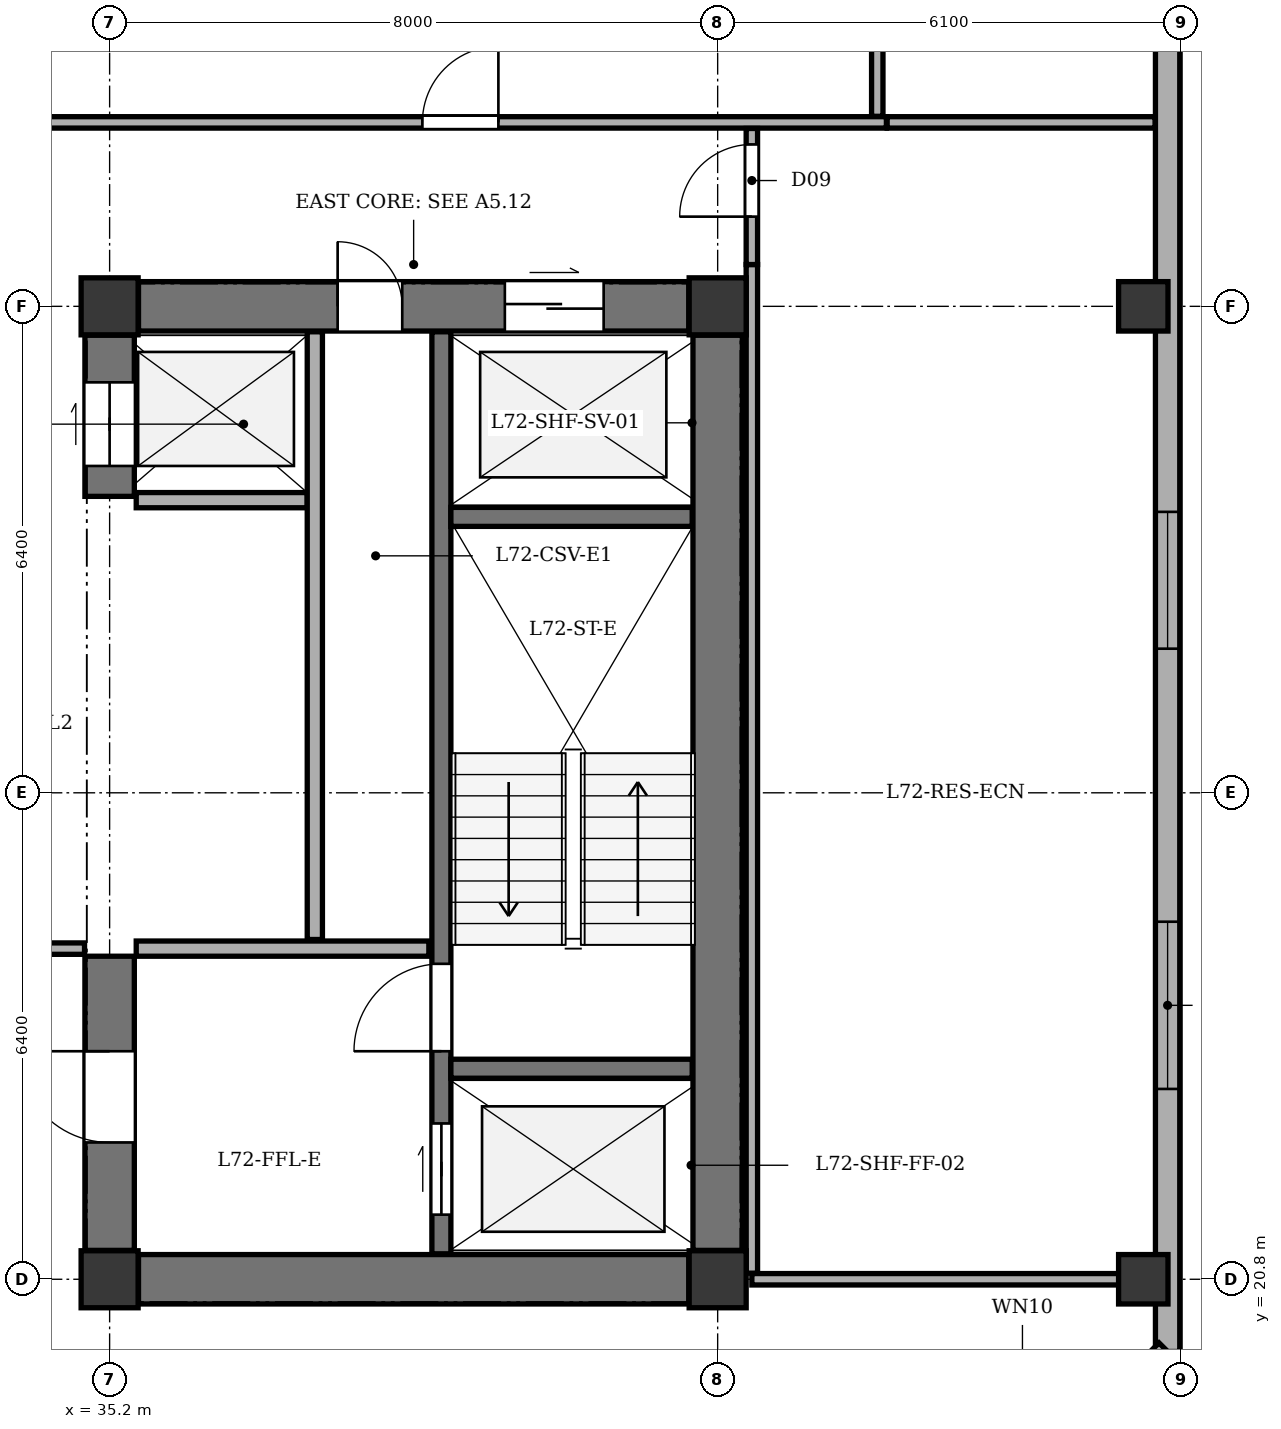
"""IFC4 building model, lengths in metres.
Left out: names, types, materials, properties, quantities, classifications, styles, units other than length and angle.
Written with IfcOpenShell. Run it as: python <this file> out.ifc"""

import sys

from ifc_helpers import new_model, si_unit, direction, frame, frame_2d, origin, origin_2d, place, context, subcontext, project, spatial, rectangle, extrude, element, fill, save


model = new_model("IFC4")
c1 = context("Model", 3, precision=1e-05, world=origin(), true_north=direction((0.0, 1.0)))
c2 = subcontext(c1, "Body", "Model", "MODEL_VIEW")
j1 = project(units=[si_unit("LENGTHUNIT", "METRE"), si_unit("PLANEANGLEUNIT", "RADIAN")], contexts=[c1])
p1 = place(None, origin())
s1 = spatial("IfcSite", under=j1, at=p1, CompositionType="ELEMENT")
p2 = place(p1, origin())
s2 = spatial("IfcBuilding", under=s1, at=p2, CompositionType="ELEMENT")
p3 = place(p2, frame((0.0, 0.0, 272.1)))
s3 = spatial("IfcBuildingStorey", under=s2, at=p3, CompositionType="ELEMENT", Elevation=272.1)
for number, where, z_axis, x_axis in (
    (1, (35.2, 20.8, 0.0), (0.0, 0.0, 1.0), (1.0, 0.0, 0.0)),
    (2, (43.2, 20.8, 0.0), (0.0, 0.0, 1.0), (1.0, 0.0, 0.0)),
    (3, (35.2, 33.6, 0.0), (0.0, 0.0, 1.0), (1.0, 0.0, 0.0)),
    (4, (43.2, 33.6, 0.0), (0.0, 0.0, 1.0), (1.0, 0.0, 0.0)),
):
    element("IfcColumn", number, at=place(p3, frame(where, z_axis=z_axis, x_axis=x_axis)), inside=s3, PredefinedType="COLUMN", context=c2, shape_type="SweptSolid", body=[
        extrude(rectangle(XDim=0.75, YDim=0.75, at=origin_2d()), origin(), (0.0, 0.0, 1.0), 3.4),
    ])
for number, where, z_axis, x_axis in (
    (5, (48.8, 20.8, 0.0), (0.0, 0.0, 1.0), (1.0, 0.0, 0.0)),
    (6, (48.8, 33.6, 0.0), (0.0, 0.0, 1.0), (1.0, 0.0, 0.0)),
):
    element("IfcColumn", number, at=place(p3, frame(where, z_axis=z_axis, x_axis=x_axis)), inside=s3, PredefinedType="COLUMN", context=c2, shape_type="SweptSolid", body=[
        extrude(rectangle(XDim=0.65, YDim=0.65, at=origin_2d()), origin(), (0.0, 0.0, 1.0), 3.4),
    ])
p4 = place(p3, frame((49.12, 41.1, 0.0), z_axis=(0.0, 0.0, 1.0), x_axis=(0.0, -1.0, 0.0)))
e7 = element("IfcWall", 7, at=p4, inside=s3, PredefinedType="STANDARD", context=c2, shape_type="SweptSolid", body=[
    extrude(rectangle(XDim=21.25, YDim=0.32, at=frame_2d((10.625, 0.0))), origin(), (0.0, 0.0, 1.0), 2.725),
])
p5 = place(p4, frame((1.74, 0.0, 0.75)))
e8 = element("IfcOpeningElement", 8, at=p5, cuts=e7, PredefinedType="OPENING", context=c2, shape_type="SweptSolid", body=[
    extrude(rectangle(XDim=1.8, YDim=1.7, at=frame_2d((0.9, 0.85))), frame((0.0, 0.17, 0.0), z_axis=(0.0, -1.0, 0.0), x_axis=(1.0, 0.0, 0.0)), (0.0, 0.0, 1.0), 0.34),
])
p6 = place(p4, frame((10.204, 0.0, 0.75)))
e9 = element("IfcOpeningElement", 9, at=p6, cuts=e7, PredefinedType="OPENING", context=c2, shape_type="SweptSolid", body=[
    extrude(rectangle(XDim=1.8, YDim=1.7, at=frame_2d((0.9, 0.85))), frame((0.0, 0.17, 0.0), z_axis=(0.0, -1.0, 0.0), x_axis=(1.0, 0.0, 0.0)), (0.0, 0.0, 1.0), 0.34),
])
p7 = place(p4, frame((15.596, 0.0, 0.75)))
e10 = element("IfcOpeningElement", 10, at=p7, cuts=e7, PredefinedType="OPENING", context=c2, shape_type="SweptSolid", body=[
    extrude(rectangle(XDim=2.2, YDim=1.7, at=frame_2d((1.1, 0.85))), frame((0.0, 0.17, 0.0), z_axis=(0.0, -1.0, 0.0), x_axis=(1.0, 0.0, 0.0)), (0.0, 0.0, 1.0), 0.34),
])
p8 = place(p3, frame((49.12, 19.85, 0.0), z_axis=(0.0, 0.0, 1.0), x_axis=(-0.707106781187, -0.707106781187, 0.0)))
e11 = element("IfcWall", 11, at=p8, inside=s3, PredefinedType="STANDARD", context=c2, shape_type="SweptSolid", body=[
    extrude(rectangle(XDim=5.402, YDim=0.32, at=frame_2d((2.701, 0.0))), origin(), (0.0, 0.0, 1.0), 2.725),
])
p9 = place(p8, frame((2.001, 0.0, 0.75)))
e12 = element("IfcOpeningElement", 12, at=p9, cuts=e11, PredefinedType="OPENING", context=c2, shape_type="SweptSolid", body=[
    extrude(rectangle(XDim=1.4, YDim=1.65, at=frame_2d((0.7, 0.825))), frame((0.0, 0.17, 0.0), z_axis=(0.0, -1.0, 0.0), x_axis=(1.0, 0.0, 0.0)), (0.0, 0.0, 1.0), 0.34),
])
p10 = place(p3, frame((43.2, 21.18, 0.0), z_axis=(0.0, 0.0, 1.0), x_axis=(0.0, 1.0, 0.0)))
e13 = element("IfcWall", 13, at=p10, inside=s3, PredefinedType="SHEAR", context=c2, shape_type="SweptSolid", body=[
    extrude(rectangle(XDim=12.04, YDim=0.65, at=frame_2d((6.02, 0.0))), origin(), (0.0, 0.0, 1.0), 3.1),
])
p11 = place(p3, frame((35.58, 20.8, 0.0), z_axis=(0.0, 0.0, 1.0), x_axis=(1.0, 0.0, 0.0)))
e14 = element("IfcWall", 14, at=p11, inside=s3, PredefinedType="SHEAR", context=c2, shape_type="SweptSolid", body=[
    extrude(rectangle(XDim=7.24, YDim=0.65, at=frame_2d((3.62, 0.0))), origin(), (0.0, 0.0, 1.0), 3.1),
])
p12 = place(p3, frame((35.58, 33.6, 0.0), z_axis=(0.0, 0.0, 1.0), x_axis=(1.0, 0.0, 0.0)))
e15 = element("IfcWall", 15, at=p12, inside=s3, PredefinedType="SHEAR", context=c2, shape_type="SweptSolid", body=[
    extrude(rectangle(XDim=7.24, YDim=0.65, at=frame_2d((3.62, 0.0))), origin(), (0.0, 0.0, 1.0), 3.1),
])
p13 = place(p12, frame((4.82, 0.0, 0.0)))
e16 = element("IfcOpeningElement", 16, at=p13, cuts=e15, PredefinedType="OPENING", context=c2, shape_type="SweptSolid", body=[
    extrude(rectangle(XDim=1.3, YDim=2.15, at=frame_2d((0.65, 1.075))), frame((0.0, 0.335, 0.0), z_axis=(0.0, -1.0, 0.0), x_axis=(1.0, 0.0, 0.0)), (0.0, 0.0, 1.0), 0.67),
])
p14 = place(p12, frame((2.62, 0.0, 0.0)))
e17 = element("IfcOpeningElement", 17, at=p14, cuts=e15, PredefinedType="OPENING", context=c2, shape_type="SweptSolid", body=[
    extrude(rectangle(XDim=0.85, YDim=2.02, at=frame_2d((0.425, 1.01))), frame((0.0, 0.335, 0.0), z_axis=(0.0, -1.0, 0.0), x_axis=(1.0, 0.0, 0.0)), (0.0, 0.0, 1.0), 0.67),
])
p15 = place(p3, frame((35.2, 21.18, 0.0), z_axis=(0.0, 0.0, 1.0), x_axis=(0.0, 1.0, 0.0)))
e18 = element("IfcWall", 18, at=p15, inside=s3, PredefinedType="SHEAR", context=c2, shape_type="SweptSolid", body=[
    extrude(rectangle(XDim=3.87, YDim=0.65, at=frame_2d((1.935, 0.0))), origin(), (0.0, 0.0, 1.0), 3.1),
])
p16 = place(p15, frame((1.42, 0.0, 0.0)))
e19 = element("IfcOpeningElement", 19, at=p16, cuts=e18, PredefinedType="OPENING", context=c2, shape_type="SweptSolid", body=[
    extrude(rectangle(XDim=1.2, YDim=2.15, at=frame_2d((0.6, 1.075))), frame((0.0, 0.335, 0.0), z_axis=(0.0, -1.0, 0.0), x_axis=(1.0, 0.0, 0.0)), (0.0, 0.0, 1.0), 0.67),
])
p17 = place(p3, frame((35.2, 31.1, 0.0), z_axis=(0.0, 0.0, 1.0), x_axis=(0.0, 1.0, 0.0)))
e20 = element("IfcWall", 20, at=p17, inside=s3, PredefinedType="SHEAR", context=c2, shape_type="SweptSolid", body=[
    extrude(rectangle(XDim=2.12, YDim=0.65, at=frame_2d((1.06, 0.0))), origin(), (0.0, 0.0, 1.0), 3.1),
])
p18 = place(p17, frame((0.4, 0.0, 0.0)))
e21 = element("IfcOpeningElement", 21, at=p18, cuts=e20, PredefinedType="OPENING", context=c2, shape_type="SweptSolid", body=[
    extrude(rectangle(XDim=1.1, YDim=2.1, at=frame_2d((0.55, 1.05))), frame((0.0, 0.335, 0.0), z_axis=(0.0, -1.0, 0.0), x_axis=(1.0, 0.0, 0.0)), (0.0, 0.0, 1.0), 0.67),
])
p19 = place(p3, frame((39.565, 21.135, 0.0), z_axis=(0.0, 0.0, 1.0), x_axis=(0.0, 1.0, 0.0)))
e22 = element("IfcWall", 22, at=p19, inside=s3, PredefinedType="SHEAR", context=c2, shape_type="SweptSolid", body=[
    extrude(rectangle(XDim=12.13, YDim=0.25, at=frame_2d((6.065, 0.0))), origin(), (0.0, 0.0, 1.0), 3.1),
])
p20 = place(p19, frame((0.515, 0.0, 0.0)))
e23 = element("IfcOpeningElement", 23, at=p20, cuts=e22, PredefinedType="OPENING", context=c2, shape_type="SweptSolid", body=[
    extrude(rectangle(XDim=1.2, YDim=2.15, at=frame_2d((0.6, 1.075))), frame((0.0, 0.135, 0.0), z_axis=(0.0, -1.0, 0.0), x_axis=(1.0, 0.0, 0.0)), (0.0, 0.0, 1.0), 0.27),
])
p21 = place(p19, frame((2.665, 0.0, 0.0)))
e24 = element("IfcOpeningElement", 24, at=p21, cuts=e22, PredefinedType="OPENING", context=c2, shape_type="SweptSolid", body=[
    extrude(rectangle(XDim=1.15, YDim=2.15, at=frame_2d((0.575, 1.075))), frame((0.0, 0.135, 0.0), z_axis=(0.0, -1.0, 0.0), x_axis=(1.0, 0.0, 0.0)), (0.0, 0.0, 1.0), 0.27),
])
for number, where, z_axis, x_axis in (
    (25, (39.69, 23.57, 0.0), (0.0, 0.0, 1.0), (1.0, 0.0, 0.0)),
    (26, (39.69, 30.83, 0.0), (0.0, 0.0, 1.0), (1.0, 0.0, 0.0)),
):
    element("IfcWall", number, at=place(p3, frame(where, z_axis=z_axis, x_axis=x_axis)), inside=s3, PredefinedType="SHEAR", context=c2, shape_type="SweptSolid", body=[
        extrude(rectangle(XDim=3.175, YDim=0.25, at=frame_2d((1.587, 0.0))), origin(), (0.0, 0.0, 1.0), 3.1),
    ])
p22 = place(p3, frame((35.55, 25.15, 0.0), z_axis=(0.0, 0.0, 1.0), x_axis=(1.0, 0.0, 0.0)))
e27 = element("IfcWall", 27, at=p22, inside=s3, PredefinedType="SOLIDWALL", context=c2, shape_type="SweptSolid", body=[
    extrude(rectangle(XDim=3.85, YDim=0.2, at=frame_2d((1.925, 0.0))), origin(), (0.0, 0.0, 1.0), 3.1),
])
p23 = place(p3, frame((35.55, 31.05, 0.0), z_axis=(0.0, 0.0, 1.0), x_axis=(1.0, 0.0, 0.0)))
e28 = element("IfcWall", 28, at=p23, inside=s3, PredefinedType="SOLIDWALL", context=c2, shape_type="SweptSolid", body=[
    extrude(rectangle(XDim=2.25, YDim=0.2, at=frame_2d((1.125, 0.0))), origin(), (0.0, 0.0, 1.0), 3.1),
])
p24 = place(p3, frame((37.9, 25.27, 0.0), z_axis=(0.0, 0.0, 1.0), x_axis=(0.0, 1.0, 0.0)))
e29 = element("IfcWall", 29, at=p24, inside=s3, PredefinedType="SOLIDWALL", context=c2, shape_type="SweptSolid", body=[
    extrude(rectangle(XDim=7.995, YDim=0.2, at=frame_2d((3.998, 0.0))), origin(), (0.0, 0.0, 1.0), 3.1),
])
p25 = place(p3, frame((29.35, 25.15, 0.0), z_axis=(0.0, 0.0, 1.0), x_axis=(1.0, 0.0, 0.0)))
e30 = element("IfcWall", 30, at=p25, inside=s3, PredefinedType="PARTITIONING", context=c2, shape_type="SweptSolid", body=[
    extrude(rectangle(XDim=5.52, YDim=0.15, at=frame_2d((2.76, 0.0))), origin(), (0.0, 0.0, 1.0), 3.1),
])
p26 = place(p3, frame((10.9, 36.02, 0.0), z_axis=(0.0, 0.0, 1.0), x_axis=(1.0, 0.0, 0.0)))
e31 = element("IfcWall", 31, at=p26, inside=s3, PredefinedType="PARTITIONING", context=c2, shape_type="SweptSolid", body=[
    extrude(rectangle(XDim=34.52, YDim=0.15, at=frame_2d((17.26, 0.0))), origin(), (0.0, 0.0, 1.0), 3.1),
])
p27 = place(p26, frame((5.276, 0.0, 0.0)))
e32 = element("IfcOpeningElement", 32, at=p27, cuts=e31, PredefinedType="OPENING", context=c2, shape_type="SweptSolid", body=[
    extrude(rectangle(XDim=1.0, YDim=2.1, at=frame_2d((0.5, 1.05))), frame((0.0, 0.085, 0.0), z_axis=(0.0, -1.0, 0.0), x_axis=(1.0, 0.0, 0.0)), (0.0, 0.0, 1.0), 0.17),
])
p28 = place(p26, frame((16.931, 0.0, 0.0)))
e33 = element("IfcOpeningElement", 33, at=p28, cuts=e31, PredefinedType="OPENING", context=c2, shape_type="SweptSolid", body=[
    extrude(rectangle(XDim=1.0, YDim=2.1, at=frame_2d((0.5, 1.05))), frame((0.0, 0.085, 0.0), z_axis=(0.0, -1.0, 0.0), x_axis=(1.0, 0.0, 0.0)), (0.0, 0.0, 1.0), 0.17),
])
p29 = place(p26, frame((28.415, 0.0, 0.0)))
e34 = element("IfcOpeningElement", 34, at=p29, cuts=e31, PredefinedType="OPENING", context=c2, shape_type="SweptSolid", body=[
    extrude(rectangle(XDim=1.0, YDim=2.1, at=frame_2d((0.5, 1.05))), frame((0.0, 0.085, 0.0), z_axis=(0.0, -1.0, 0.0), x_axis=(1.0, 0.0, 0.0)), (0.0, 0.0, 1.0), 0.17),
])
p30 = place(p3, frame((45.3, 36.1, 0.0), z_axis=(0.0, 0.0, 1.0), x_axis=(0.0, 1.0, 0.0)))
e35 = element("IfcWall", 35, at=p30, inside=s3, PredefinedType="PARTITIONING", context=c2, shape_type="SweptSolid", body=[
    extrude(rectangle(XDim=8.655, YDim=0.15, at=frame_2d((4.327, 0.0))), origin(), (0.0, 0.0, 1.0), 3.1),
])
p31 = place(p3, frame((43.65, 20.8, 0.0), z_axis=(0.0, 0.0, 1.0), x_axis=(1.0, 0.0, 0.0)))
e36 = element("IfcWall", 36, at=p31, inside=s3, PredefinedType="PARTITIONING", context=c2, shape_type="SweptSolid", body=[
    extrude(rectangle(XDim=5.305, YDim=0.15, at=frame_2d((2.653, 0.0))), origin(), (0.0, 0.0, 1.0), 2.535),
])
p32 = place(p3, frame((45.43, 36.02, 0.0), z_axis=(0.0, 0.0, 1.0), x_axis=(1.0, 0.0, 0.0)))
e37 = element("IfcWall", 37, at=p32, inside=s3, PredefinedType="PARTITIONING", context=c2, shape_type="SweptSolid", body=[
    extrude(rectangle(XDim=3.525, YDim=0.15, at=frame_2d((1.763, 0.0))), origin(), (0.0, 0.0, 1.0), 3.1),
])
p33 = place(p3, frame((43.65, 20.88, 0.0), z_axis=(0.0, 0.0, 1.0), x_axis=(0.0, 1.0, 0.0)))
e38 = element("IfcWall", 38, at=p33, inside=s3, PredefinedType="PARTITIONING", context=c2, shape_type="SweptSolid", body=[
    extrude(rectangle(XDim=13.27, YDim=0.15, at=frame_2d((6.635, 0.0))), origin(), (0.0, 0.0, 1.0), 3.1),
])
p34 = place(p3, frame((43.65, 34.15, 0.0), z_axis=(0.0, 0.0, 1.0), x_axis=(0.0, 1.0, 0.0)))
e39 = element("IfcWall", 39, at=p34, inside=s3, PredefinedType="PARTITIONING", context=c2, shape_type="SweptSolid", body=[
    extrude(rectangle(XDim=1.79, YDim=0.15, at=frame_2d((0.895, 0.0))), origin(), (0.0, 0.0, 1.0), 3.1),
])
p35 = place(p34, frame((0.63, 0.0, 0.0)))
e40 = element("IfcOpeningElement", 40, at=p35, cuts=e39, PredefinedType="OPENING", context=c2, shape_type="SweptSolid", body=[
    extrude(rectangle(XDim=0.95, YDim=2.1, at=frame_2d((0.475, 1.05))), frame((0.0, 0.085, 0.0), z_axis=(0.0, -1.0, 0.0), x_axis=(1.0, 0.0, 0.0)), (0.0, 0.0, 1.0), 0.17),
])
p36 = place(p6, origin())
e41 = element("IfcWindow", 41, at=p36, inside=s3, PartitioningType="SINGLE_PANEL", PredefinedType="WINDOW", context=c2, shape_type="SweptSolid", body=[
    extrude(rectangle(XDim=1.8, YDim=1.7, at=frame_2d((0.9, 0.85))), frame((0.0, -0.01, 0.0), z_axis=(0.0, -1.0, 0.0), x_axis=(1.0, 0.0, 0.0)), (0.0, 0.0, 1.0), 0.06),
])
fill(e9, e41)
p37 = place(p7, origin())
e42 = element("IfcWindow", 42, at=p37, inside=s3, PartitioningType="SINGLE_PANEL", PredefinedType="WINDOW", context=c2, shape_type="SweptSolid", body=[
    extrude(rectangle(XDim=2.2, YDim=1.7, at=frame_2d((1.1, 0.85))), frame((0.0, -0.01, 0.0), z_axis=(0.0, -1.0, 0.0), x_axis=(1.0, 0.0, 0.0)), (0.0, 0.0, 1.0), 0.06),
])
fill(e10, e42)
p38 = place(p13, origin())
e43 = element("IfcDoor", 43, at=p38, inside=s3, OperationType="DOUBLE_DOOR_SLIDING", PredefinedType="DOOR", context=c2, shape_type="SweptSolid", body=[
    extrude(rectangle(XDim=1.3, YDim=2.15, at=frame_2d((0.65, 1.075))), frame((0.0, 0.025, 0.0), z_axis=(0.0, -1.0, 0.0), x_axis=(1.0, 0.0, 0.0)), (0.0, 0.0, 1.0), 0.05),
])
fill(e16, e43)
p39 = place(p14, origin())
e44 = element("IfcDoor", 44, at=p39, inside=s3, OperationType="SINGLE_SWING_LEFT", PredefinedType="DOOR", context=c2, shape_type="SweptSolid", body=[
    extrude(rectangle(XDim=0.85, YDim=2.02, at=frame_2d((0.425, 1.01))), frame((0.0, 0.025, 0.0), z_axis=(0.0, -1.0, 0.0), x_axis=(1.0, 0.0, 0.0)), (0.0, 0.0, 1.0), 0.05),
])
fill(e17, e44)
p40 = place(p16, origin())
e45 = element("IfcDoor", 45, at=p40, inside=s3, OperationType="SINGLE_SWING_RIGHT", PredefinedType="DOOR", context=c2, shape_type="SweptSolid", body=[
    extrude(rectangle(XDim=1.2, YDim=2.15, at=frame_2d((0.6, 1.075))), frame((0.0, 0.025, 0.0), z_axis=(0.0, -1.0, 0.0), x_axis=(1.0, 0.0, 0.0)), (0.0, 0.0, 1.0), 0.05),
])
fill(e19, e45)
p41 = place(p18, origin())
e46 = element("IfcDoor", 46, at=p41, inside=s3, OperationType="DOUBLE_DOOR_SLIDING", PredefinedType="DOOR", context=c2, shape_type="SweptSolid", body=[
    extrude(rectangle(XDim=1.1, YDim=2.1, at=frame_2d((0.55, 1.05))), frame((0.0, 0.025, 0.0), z_axis=(0.0, -1.0, 0.0), x_axis=(1.0, 0.0, 0.0)), (0.0, 0.0, 1.0), 0.05),
])
fill(e21, e46)
p42 = place(p20, origin())
e47 = element("IfcDoor", 47, at=p42, inside=s3, OperationType="DOUBLE_DOOR_SLIDING", PredefinedType="DOOR", context=c2, shape_type="SweptSolid", body=[
    extrude(rectangle(XDim=1.2, YDim=2.15, at=frame_2d((0.6, 1.075))), frame((0.0, 0.025, 0.0), z_axis=(0.0, -1.0, 0.0), x_axis=(1.0, 0.0, 0.0)), (0.0, 0.0, 1.0), 0.05),
])
fill(e23, e47)
p43 = place(p21, origin())
e48 = element("IfcDoor", 48, at=p43, inside=s3, OperationType="SINGLE_SWING_LEFT", PredefinedType="DOOR", context=c2, shape_type="SweptSolid", body=[
    extrude(rectangle(XDim=1.15, YDim=2.15, at=frame_2d((0.575, 1.075))), frame((0.0, 0.025, 0.0), z_axis=(0.0, -1.0, 0.0), x_axis=(1.0, 0.0, 0.0)), (0.0, 0.0, 1.0), 0.05),
])
fill(e24, e48)
p44 = place(p29, origin())
e49 = element("IfcDoor", 49, at=p44, inside=s3, OperationType="SINGLE_SWING_RIGHT", PredefinedType="DOOR", context=c2, shape_type="SweptSolid", body=[
    extrude(rectangle(XDim=1.0, YDim=2.1, at=frame_2d((0.5, 1.05))), frame((0.0, 0.025, 0.0), z_axis=(0.0, -1.0, 0.0), x_axis=(1.0, 0.0, 0.0)), (0.0, 0.0, 1.0), 0.05),
])
fill(e34, e49)
p45 = place(p35, origin())
e50 = element("IfcDoor", 50, at=p45, inside=s3, OperationType="SINGLE_SWING_LEFT", PredefinedType="DOOR", context=c2, shape_type="SweptSolid", body=[
    extrude(rectangle(XDim=0.95, YDim=2.1, at=frame_2d((0.475, 1.05))), frame((0.0, 0.025, 0.0), z_axis=(0.0, -1.0, 0.0), x_axis=(1.0, 0.0, 0.0)), (0.0, 0.0, 1.0), 0.05),
])
fill(e40, e50)
save(model, sys.argv[1])
